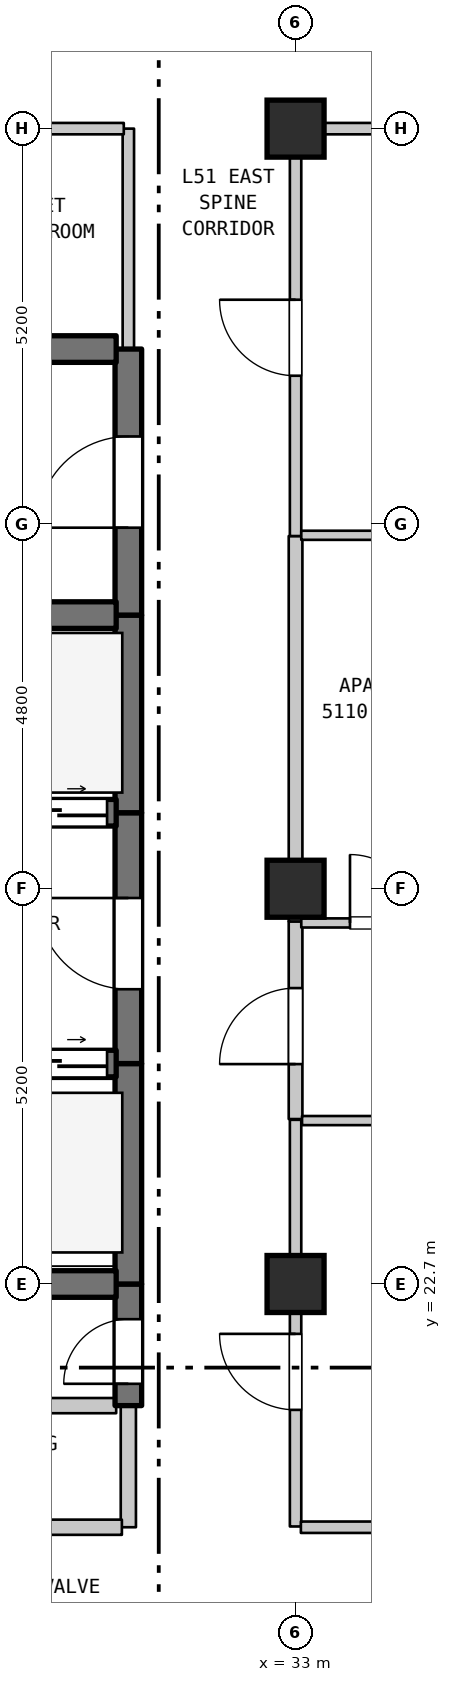
"""IFC4 building model, lengths in metres.
Left out: names, types, materials, properties, quantities, classifications, styles, units other than length and angle.
Written with IfcOpenShell. Run it as: python <this file> out.ifc"""

import sys

from ifc_helpers import new_model, si_unit, direction, frame, frame_2d, origin, origin_2d, place, context, subcontext, project, spatial, rectangle, extrude, element, fill, save


model = new_model("IFC4")
c1 = context("Model", 3, precision=1e-05, world=origin(), true_north=direction((0.0, 1.0)))
c2 = subcontext(c1, "Body", "Model", "MODEL_VIEW")
j1 = project(units=[si_unit("LENGTHUNIT", "METRE"), si_unit("PLANEANGLEUNIT", "RADIAN")], contexts=[c1])
p1 = place(None, origin())
s1 = spatial("IfcSite", under=j1, at=p1, CompositionType="ELEMENT")
p2 = place(p1, origin())
s2 = spatial("IfcBuilding", under=s1, at=p2, CompositionType="ELEMENT")
p3 = place(p2, frame((0.0, 0.0, 206.9)))
s3 = spatial("IfcBuildingStorey", under=s2, at=p3, CompositionType="ELEMENT", Elevation=206.9)
for number, where, z_axis, x_axis in (
    (1, (33.0, 22.7, 0.0), (0.0, 0.0, 1.0), (1.0, 0.0, 0.0)),
    (2, (33.0, 27.9, 0.0), (0.0, 0.0, 1.0), (1.0, 0.0, 0.0)),
    (3, (33.0, 37.9, 0.0), (0.0, 0.0, 1.0), (1.0, 0.0, 0.0)),
):
    element("IfcColumn", number, at=place(p3, frame(where, z_axis=z_axis, x_axis=x_axis)), inside=s3, PredefinedType="COLUMN", context=c2, shape_type="SweptSolid", body=[
        extrude(rectangle(XDim=0.75, YDim=0.75, at=origin_2d()), origin(), (0.0, 0.0, 1.0), 3.7),
    ])
p4 = place(p3, frame((30.8, 19.5, 0.0), z_axis=(0.0, 0.0, 1.0), x_axis=(0.0, 1.0, 0.0)))
e4 = element("IfcWall", 4, at=p4, inside=s3, PredefinedType="STANDARD", context=c2, shape_type="SweptSolid", body=[
    extrude(rectangle(XDim=1.6, YDim=0.2, at=frame_2d((0.8, 0.0))), origin(), (0.0, 0.0, 1.0), 3.39),
])
p5 = place(p3, frame((30.8, 21.1, 0.0), z_axis=(0.0, 0.0, 1.0), x_axis=(0.0, 1.0, 0.0)))
e5 = element("IfcWall", 5, at=p5, inside=s3, PredefinedType="SHEAR", context=c2, shape_type="SweptSolid", body=[
    extrude(rectangle(XDim=1.6, YDim=0.35, at=frame_2d((0.8, 0.0))), origin(), (0.0, 0.0, 1.0), 3.39),
])
p6 = place(p5, frame((0.287, 0.0, 0.0)))
e6 = element("IfcOpeningElement", 6, at=p6, cuts=e5, PredefinedType="OPENING", context=c2, shape_type="SweptSolid", body=[
    extrude(rectangle(XDim=0.85, YDim=2.1, at=frame_2d((0.425, 1.05))), frame((0.0, 0.185, 0.0), z_axis=(0.0, -1.0, 0.0), x_axis=(1.0, 0.0, 0.0)), (0.0, 0.0, 1.0), 0.37),
])
p7 = place(p3, frame((30.8, 22.7, 0.0), z_axis=(0.0, 0.0, 1.0), x_axis=(0.0, 1.0, 0.0)))
e7 = element("IfcWall", 7, at=p7, inside=s3, PredefinedType="SHEAR", context=c2, shape_type="SweptSolid", body=[
    extrude(rectangle(XDim=2.9, YDim=0.35, at=frame_2d((1.45, 0.0))), origin(), (0.0, 0.0, 1.0), 3.39),
])
p8 = place(p3, frame((30.8, 25.6, 0.0), z_axis=(0.0, 0.0, 1.0), x_axis=(0.0, 1.0, 0.0)))
e8 = element("IfcWall", 8, at=p8, inside=s3, PredefinedType="SHEAR", context=c2, shape_type="SweptSolid", body=[
    extrude(rectangle(XDim=3.3, YDim=0.35, at=frame_2d((1.65, 0.0))), origin(), (0.0, 0.0, 1.0), 3.39),
])
p9 = place(p8, frame((0.978, 0.0, 0.0)))
e9 = element("IfcOpeningElement", 9, at=p9, cuts=e8, PredefinedType="OPENING", context=c2, shape_type="SweptSolid", body=[
    extrude(rectangle(XDim=1.2, YDim=2.2, at=frame_2d((0.6, 1.1))), frame((0.0, 0.185, 0.0), z_axis=(0.0, -1.0, 0.0), x_axis=(1.0, 0.0, 0.0)), (0.0, 0.0, 1.0), 0.37),
])
p10 = place(p3, frame((30.8, 28.9, 0.0), z_axis=(0.0, 0.0, 1.0), x_axis=(0.0, 1.0, 0.0)))
e10 = element("IfcWall", 10, at=p10, inside=s3, PredefinedType="SHEAR", context=c2, shape_type="SweptSolid", body=[
    extrude(rectangle(XDim=2.6, YDim=0.35, at=frame_2d((1.3, 0.0))), origin(), (0.0, 0.0, 1.0), 3.39),
])
p11 = place(p3, frame((30.8, 31.5, 0.0), z_axis=(0.0, 0.0, 1.0), x_axis=(0.0, 1.0, 0.0)))
e11 = element("IfcWall", 11, at=p11, inside=s3, PredefinedType="SHEAR", context=c2, shape_type="SweptSolid", body=[
    extrude(rectangle(XDim=3.5, YDim=0.35, at=frame_2d((1.75, 0.0))), origin(), (0.0, 0.0, 1.0), 3.39),
])
p12 = place(p11, frame((1.15, 0.0, 0.0)))
e12 = element("IfcOpeningElement", 12, at=p12, cuts=e11, PredefinedType="OPENING", context=c2, shape_type="SweptSolid", body=[
    extrude(rectangle(XDim=1.2, YDim=2.2, at=frame_2d((0.6, 1.1))), frame((0.0, 0.185, 0.0), z_axis=(0.0, -1.0, 0.0), x_axis=(1.0, 0.0, 0.0)), (0.0, 0.0, 1.0), 0.37),
])
p13 = place(p3, frame((30.8, 35.0, 0.0), z_axis=(0.0, 0.0, 1.0), x_axis=(0.0, 1.0, 0.0)))
e13 = element("IfcWall", 13, at=p13, inside=s3, PredefinedType="STANDARD", context=c2, shape_type="SweptSolid", body=[
    extrude(rectangle(XDim=2.9, YDim=0.15, at=frame_2d((1.45, 0.0))), origin(), (0.0, 0.0, 1.0), 3.39),
])
p14 = place(p3, frame((33.0, 19.51, 0.0), z_axis=(0.0, 0.0, 1.0), x_axis=(0.0, 1.0, 0.0)))
e14 = element("IfcWall", 14, at=p14, inside=s3, PredefinedType="STANDARD", context=c2, shape_type="SweptSolid", body=[
    extrude(rectangle(XDim=5.35, YDim=0.15, at=frame_2d((2.675, 0.0))), origin(), (0.0, 0.0, 1.0), 2.99),
])
p15 = place(p14, frame((1.534, 0.0, 0.0)))
e15 = element("IfcOpeningElement", 15, at=p15, cuts=e14, PredefinedType="OPENING", context=c2, shape_type="SweptSolid", body=[
    extrude(rectangle(XDim=1.0, YDim=2.15, at=frame_2d((0.5, 1.075))), frame((0.0, 0.085, 0.0), z_axis=(0.0, -1.0, 0.0), x_axis=(1.0, 0.0, 0.0)), (0.0, 0.0, 1.0), 0.17),
])
p16 = place(p3, frame((33.0, 24.87, 0.0), z_axis=(0.0, 0.0, 1.0), x_axis=(0.0, 1.0, 0.0)))
e16 = element("IfcWall", 16, at=p16, inside=s3, PredefinedType="STANDARD", context=c2, shape_type="SweptSolid", body=[
    extrude(rectangle(XDim=2.6, YDim=0.18, at=frame_2d((1.3, 0.0))), origin(), (0.0, 0.0, 1.0), 2.99),
])
p17 = place(p16, frame((0.723, 0.0, 0.0)))
e17 = element("IfcOpeningElement", 17, at=p17, cuts=e16, PredefinedType="OPENING", context=c2, shape_type="SweptSolid", body=[
    extrude(rectangle(XDim=1.0, YDim=2.15, at=frame_2d((0.5, 1.075))), frame((0.0, 0.1, 0.0), z_axis=(0.0, -1.0, 0.0), x_axis=(1.0, 0.0, 0.0)), (0.0, 0.0, 1.0), 0.2),
])
p18 = place(p3, frame((33.0, 27.47, 0.0), z_axis=(0.0, 0.0, 1.0), x_axis=(0.0, 1.0, 0.0)))
e18 = element("IfcWall", 18, at=p18, inside=s3, PredefinedType="STANDARD", context=c2, shape_type="SweptSolid", body=[
    extrude(rectangle(XDim=5.07, YDim=0.18, at=frame_2d((2.535, 0.0))), origin(), (0.0, 0.0, 1.0), 2.89),
])
p19 = place(p3, frame((33.0, 32.54, 0.0), z_axis=(0.0, 0.0, 1.0), x_axis=(0.0, 1.0, 0.0)))
e19 = element("IfcWall", 19, at=p19, inside=s3, PredefinedType="STANDARD", context=c2, shape_type="SweptSolid", body=[
    extrude(rectangle(XDim=5.36, YDim=0.15, at=frame_2d((2.68, 0.0))), origin(), (0.0, 0.0, 1.0), 2.89),
])
p20 = place(p19, frame((2.109, 0.0, 0.0)))
e20 = element("IfcOpeningElement", 20, at=p20, cuts=e19, PredefinedType="OPENING", context=c2, shape_type="SweptSolid", body=[
    extrude(rectangle(XDim=1.0, YDim=2.15, at=frame_2d((0.5, 1.075))), frame((0.0, 0.085, 0.0), z_axis=(0.0, -1.0, 0.0), x_axis=(1.0, 0.0, 0.0)), (0.0, 0.0, 1.0), 0.17),
])
p21 = place(p3, frame((27.285, 19.5, 0.0), z_axis=(0.0, 0.0, 1.0), x_axis=(1.0, 0.0, 0.0)))
e21 = element("IfcWall", 21, at=p21, inside=s3, PredefinedType="STANDARD", context=c2, shape_type="SweptSolid", body=[
    extrude(rectangle(XDim=3.43, YDim=0.2, at=frame_2d((1.715, 0.0))), origin(), (0.0, 0.0, 1.0), 3.39),
])
p22 = place(p21, frame((1.192, 0.0, 0.0)))
e22 = element("IfcOpeningElement", 22, at=p22, cuts=e21, PredefinedType="OPENING", context=c2, shape_type="SweptSolid", body=[
    extrude(rectangle(XDim=0.9, YDim=2.15, at=frame_2d((0.45, 1.075))), frame((0.0, 0.11, 0.0), z_axis=(0.0, -1.0, 0.0), x_axis=(1.0, 0.0, 0.0)), (0.0, 0.0, 1.0), 0.22),
])
p23 = place(p3, frame((33.07, 19.5, 0.0), z_axis=(0.0, 0.0, 1.0), x_axis=(1.0, 0.0, 0.0)))
e23 = element("IfcWall", 23, at=p23, inside=s3, PredefinedType="STANDARD", context=c2, shape_type="SweptSolid", body=[
    extrude(rectangle(XDim=21.51, YDim=0.15, at=frame_2d((10.755, 0.0))), origin(), (0.0, 0.0, 1.0), 3.39),
])
p24 = place(p23, frame((10.185, 0.0, 0.0)))
e24 = element("IfcOpeningElement", 24, at=p24, cuts=e23, PredefinedType="OPENING", context=c2, shape_type="SweptSolid", body=[
    extrude(rectangle(XDim=1.0, YDim=2.15, at=frame_2d((0.5, 1.075))), frame((0.0, 0.085, 0.0), z_axis=(0.0, -1.0, 0.0), x_axis=(1.0, 0.0, 0.0)), (0.0, 0.0, 1.0), 0.17),
])
p25 = place(p3, frame((27.285, 21.1, 0.0), z_axis=(0.0, 0.0, 1.0), x_axis=(1.0, 0.0, 0.0)))
e25 = element("IfcWall", 25, at=p25, inside=s3, PredefinedType="STANDARD", context=c2, shape_type="SweptSolid", body=[
    extrude(rectangle(XDim=3.355, YDim=0.2, at=frame_2d((1.677, 0.0))), origin(), (0.0, 0.0, 1.0), 3.39),
])
p26 = place(p3, frame((27.46, 22.7, 0.0), z_axis=(0.0, 0.0, 1.0), x_axis=(1.0, 0.0, 0.0)))
e26 = element("IfcWall", 26, at=p26, inside=s3, PredefinedType="SHEAR", context=c2, shape_type="SweptSolid", body=[
    extrude(rectangle(XDim=3.18, YDim=0.35, at=frame_2d((1.59, 0.0))), origin(), (0.0, 0.0, 1.0), 3.39),
])
p27 = place(p3, frame((33.085, 24.85, 0.0), z_axis=(0.0, 0.0, 1.0), x_axis=(1.0, 0.0, 0.0)))
e27 = element("IfcWall", 27, at=p27, inside=s3, PredefinedType="PARTITIONING", context=c2, shape_type="SweptSolid", body=[
    extrude(rectangle(XDim=23.905, YDim=0.12, at=frame_2d((11.953, 0.0))), origin(), (0.0, 0.0, 1.0), 3.39),
])
p28 = place(p3, frame((27.46, 25.6, 0.0), z_axis=(0.0, 0.0, 1.0), x_axis=(1.0, 0.0, 0.0)))
e28 = element("IfcWall", 28, at=p28, inside=s3, PredefinedType="SHEAR", context=c2, shape_type="SweptSolid", body=[
    extrude(rectangle(XDim=3.18, YDim=0.35, at=frame_2d((1.59, 0.0))), origin(), (0.0, 0.0, 1.0), 3.39),
])
p29 = place(p28, frame((0.12, 0.0, 0.0)))
e29 = element("IfcOpeningElement", 29, at=p29, cuts=e28, PredefinedType="OPENING", context=c2, shape_type="SweptSolid", body=[
    extrude(rectangle(XDim=1.25, YDim=2.2, at=frame_2d((0.625, 1.1))), frame((0.0, 0.185, 0.0), z_axis=(0.0, -1.0, 0.0), x_axis=(1.0, 0.0, 0.0)), (0.0, 0.0, 1.0), 0.37),
])
p30 = place(p28, frame((1.81, 0.0, 0.0)))
e30 = element("IfcOpeningElement", 30, at=p30, cuts=e28, PredefinedType="OPENING", context=c2, shape_type="SweptSolid", body=[
    extrude(rectangle(XDim=1.25, YDim=2.2, at=frame_2d((0.625, 1.1))), frame((0.0, 0.185, 0.0), z_axis=(0.0, -1.0, 0.0), x_axis=(1.0, 0.0, 0.0)), (0.0, 0.0, 1.0), 0.37),
])
p31 = place(p3, frame((33.075, 27.45, 0.0), z_axis=(0.0, 0.0, 1.0), x_axis=(1.0, 0.0, 0.0)))
e31 = element("IfcWall", 31, at=p31, inside=s3, PredefinedType="PARTITIONING", context=c2, shape_type="SweptSolid", body=[
    extrude(rectangle(XDim=2.364, YDim=0.12, at=frame_2d((1.182, 0.0))), origin(), (0.0, 0.0, 1.0), 3.39),
])
p32 = place(p31, frame((0.641, 0.0, 0.0)))
e32 = element("IfcOpeningElement", 32, at=p32, cuts=e31, PredefinedType="OPENING", context=c2, shape_type="SweptSolid", body=[
    extrude(rectangle(XDim=0.9, YDim=2.15, at=frame_2d((0.45, 1.075))), frame((0.0, 0.07, 0.0), z_axis=(0.0, -1.0, 0.0), x_axis=(1.0, 0.0, 0.0)), (0.0, 0.0, 1.0), 0.14),
])
p33 = place(p3, frame((27.46, 28.9, 0.0), z_axis=(0.0, 0.0, 1.0), x_axis=(1.0, 0.0, 0.0)))
e33 = element("IfcWall", 33, at=p33, inside=s3, PredefinedType="SHEAR", context=c2, shape_type="SweptSolid", body=[
    extrude(rectangle(XDim=3.18, YDim=0.35, at=frame_2d((1.59, 0.0))), origin(), (0.0, 0.0, 1.0), 3.39),
])
p34 = place(p33, frame((0.12, 0.0, 0.0)))
e34 = element("IfcOpeningElement", 34, at=p34, cuts=e33, PredefinedType="OPENING", context=c2, shape_type="SweptSolid", body=[
    extrude(rectangle(XDim=1.25, YDim=2.2, at=frame_2d((0.625, 1.1))), frame((0.0, 0.185, 0.0), z_axis=(0.0, -1.0, 0.0), x_axis=(1.0, 0.0, 0.0)), (0.0, 0.0, 1.0), 0.37),
])
p35 = place(p33, frame((1.81, 0.0, 0.0)))
e35 = element("IfcOpeningElement", 35, at=p35, cuts=e33, PredefinedType="OPENING", context=c2, shape_type="SweptSolid", body=[
    extrude(rectangle(XDim=1.25, YDim=2.2, at=frame_2d((0.625, 1.1))), frame((0.0, 0.185, 0.0), z_axis=(0.0, -1.0, 0.0), x_axis=(1.0, 0.0, 0.0)), (0.0, 0.0, 1.0), 0.37),
])
p36 = place(p3, frame((27.46, 31.5, 0.0), z_axis=(0.0, 0.0, 1.0), x_axis=(1.0, 0.0, 0.0)))
e36 = element("IfcWall", 36, at=p36, inside=s3, PredefinedType="SHEAR", context=c2, shape_type="SweptSolid", body=[
    extrude(rectangle(XDim=3.18, YDim=0.35, at=frame_2d((1.59, 0.0))), origin(), (0.0, 0.0, 1.0), 3.39),
])
p37 = place(p3, frame((33.075, 32.55, 0.0), z_axis=(0.0, 0.0, 1.0), x_axis=(1.0, 0.0, 0.0)))
e37 = element("IfcWall", 37, at=p37, inside=s3, PredefinedType="PARTITIONING", context=c2, shape_type="SweptSolid", body=[
    extrude(rectangle(XDim=2.364, YDim=0.12, at=frame_2d((1.182, 0.0))), origin(), (0.0, 0.0, 1.0), 3.39),
])
p38 = place(p3, frame((26.645, 35.0, 0.0), z_axis=(0.0, 0.0, 1.0), x_axis=(1.0, 0.0, 0.0)))
e38 = element("IfcWall", 38, at=p38, inside=s3, PredefinedType="SHEAR", context=c2, shape_type="SweptSolid", body=[
    extrude(rectangle(XDim=3.995, YDim=0.35, at=frame_2d((1.998, 0.0))), origin(), (0.0, 0.0, 1.0), 3.39),
])
p39 = place(p38, frame((1.508, 0.0, 0.0)))
e39 = element("IfcOpeningElement", 39, at=p39, cuts=e38, PredefinedType="OPENING", context=c2, shape_type="SweptSolid", body=[
    extrude(rectangle(XDim=0.95, YDim=2.15, at=frame_2d((0.475, 1.075))), frame((0.0, 0.185, 0.0), z_axis=(0.0, -1.0, 0.0), x_axis=(1.0, 0.0, 0.0)), (0.0, 0.0, 1.0), 0.37),
])
p40 = place(p3, frame((26.645, 37.9, 0.0), z_axis=(0.0, 0.0, 1.0), x_axis=(1.0, 0.0, 0.0)))
e40 = element("IfcWall", 40, at=p40, inside=s3, PredefinedType="STANDARD", context=c2, shape_type="SweptSolid", body=[
    extrude(rectangle(XDim=4.095, YDim=0.15, at=frame_2d((2.047, 0.0))), origin(), (0.0, 0.0, 1.0), 2.89),
])
p41 = place(p3, frame((33.06, 37.9, 0.0), z_axis=(0.0, 0.0, 1.0), x_axis=(1.0, 0.0, 0.0)))
e41 = element("IfcWall", 41, at=p41, inside=s3, PredefinedType="STANDARD", context=c2, shape_type="SweptSolid", body=[
    extrude(rectangle(XDim=7.164, YDim=0.15, at=frame_2d((3.582, 0.0))), origin(), (0.0, 0.0, 1.0), 3.39),
])
p42 = place(p41, frame((3.004, 0.0, 0.0)))
e42 = element("IfcOpeningElement", 42, at=p42, cuts=e41, PredefinedType="OPENING", context=c2, shape_type="SweptSolid", body=[
    extrude(rectangle(XDim=1.0, YDim=2.15, at=frame_2d((0.5, 1.075))), frame((0.0, 0.085, 0.0), z_axis=(0.0, -1.0, 0.0), x_axis=(1.0, 0.0, 0.0)), (0.0, 0.0, 1.0), 0.17),
])
p43 = place(p6, origin())
e43 = element("IfcDoor", 43, at=p43, inside=s3, OperationType="SINGLE_SWING_LEFT", PredefinedType="DOOR", context=c2, shape_type="SweptSolid", body=[
    extrude(rectangle(XDim=0.85, YDim=2.1, at=frame_2d((0.425, 1.05))), frame((0.0, 0.025, 0.0), z_axis=(0.0, -1.0, 0.0), x_axis=(1.0, 0.0, 0.0)), (0.0, 0.0, 1.0), 0.05),
])
fill(e6, e43)
p44 = place(p9, origin())
e44 = element("IfcDoor", 44, at=p44, inside=s3, OperationType="SINGLE_SWING_RIGHT", PredefinedType="DOOR", context=c2, shape_type="SweptSolid", body=[
    extrude(rectangle(XDim=1.2, YDim=2.2, at=frame_2d((0.6, 1.1))), frame((0.0, 0.025, 0.0), z_axis=(0.0, -1.0, 0.0), x_axis=(1.0, 0.0, 0.0)), (0.0, 0.0, 1.0), 0.05),
])
fill(e9, e44)
p45 = place(p12, origin())
e45 = element("IfcDoor", 45, at=p45, inside=s3, OperationType="SINGLE_SWING_LEFT", PredefinedType="DOOR", context=c2, shape_type="SweptSolid", body=[
    extrude(rectangle(XDim=1.2, YDim=2.2, at=frame_2d((0.6, 1.1))), frame((0.0, 0.025, 0.0), z_axis=(0.0, -1.0, 0.0), x_axis=(1.0, 0.0, 0.0)), (0.0, 0.0, 1.0), 0.05),
])
fill(e12, e45)
p46 = place(p15, origin())
e46 = element("IfcDoor", 46, at=p46, inside=s3, OperationType="SINGLE_SWING_RIGHT", PredefinedType="DOOR", context=c2, shape_type="SweptSolid", body=[
    extrude(rectangle(XDim=1.0, YDim=2.15, at=frame_2d((0.5, 1.075))), frame((0.0, 0.025, 0.0), z_axis=(0.0, -1.0, 0.0), x_axis=(1.0, 0.0, 0.0)), (0.0, 0.0, 1.0), 0.05),
])
fill(e15, e46)
p47 = place(p17, origin())
e47 = element("IfcDoor", 47, at=p47, inside=s3, OperationType="SINGLE_SWING_LEFT", PredefinedType="DOOR", context=c2, shape_type="SweptSolid", body=[
    extrude(rectangle(XDim=1.0, YDim=2.15, at=frame_2d((0.5, 1.075))), frame((0.0, 0.025, 0.0), z_axis=(0.0, -1.0, 0.0), x_axis=(1.0, 0.0, 0.0)), (0.0, 0.0, 1.0), 0.05),
])
fill(e17, e47)
p48 = place(p20, origin())
e48 = element("IfcDoor", 48, at=p48, inside=s3, OperationType="SINGLE_SWING_RIGHT", PredefinedType="DOOR", context=c2, shape_type="SweptSolid", body=[
    extrude(rectangle(XDim=1.0, YDim=2.15, at=frame_2d((0.5, 1.075))), frame((0.0, 0.025, 0.0), z_axis=(0.0, -1.0, 0.0), x_axis=(1.0, 0.0, 0.0)), (0.0, 0.0, 1.0), 0.05),
])
fill(e20, e48)
p49 = place(p30, origin())
e49 = element("IfcDoor", 49, at=p49, inside=s3, OperationType="DOUBLE_DOOR_SLIDING", PredefinedType="DOOR", context=c2, shape_type="SweptSolid", body=[
    extrude(rectangle(XDim=1.25, YDim=2.2, at=frame_2d((0.625, 1.1))), frame((0.0, 0.025, 0.0), z_axis=(0.0, -1.0, 0.0), x_axis=(1.0, 0.0, 0.0)), (0.0, 0.0, 1.0), 0.05),
])
fill(e30, e49)
p50 = place(p32, origin())
e50 = element("IfcDoor", 50, at=p50, inside=s3, OperationType="SINGLE_SWING_LEFT", PredefinedType="DOOR", context=c2, shape_type="SweptSolid", body=[
    extrude(rectangle(XDim=0.9, YDim=2.15, at=frame_2d((0.45, 1.075))), frame((0.0, 0.025, 0.0), z_axis=(0.0, -1.0, 0.0), x_axis=(1.0, 0.0, 0.0)), (0.0, 0.0, 1.0), 0.05),
])
fill(e32, e50)
p51 = place(p35, origin())
e51 = element("IfcDoor", 51, at=p51, inside=s3, OperationType="DOUBLE_DOOR_SLIDING", PredefinedType="DOOR", context=c2, shape_type="SweptSolid", body=[
    extrude(rectangle(XDim=1.25, YDim=2.2, at=frame_2d((0.625, 1.1))), frame((0.0, 0.025, 0.0), z_axis=(0.0, -1.0, 0.0), x_axis=(1.0, 0.0, 0.0)), (0.0, 0.0, 1.0), 0.05),
])
fill(e35, e51)
save(model, sys.argv[1])
